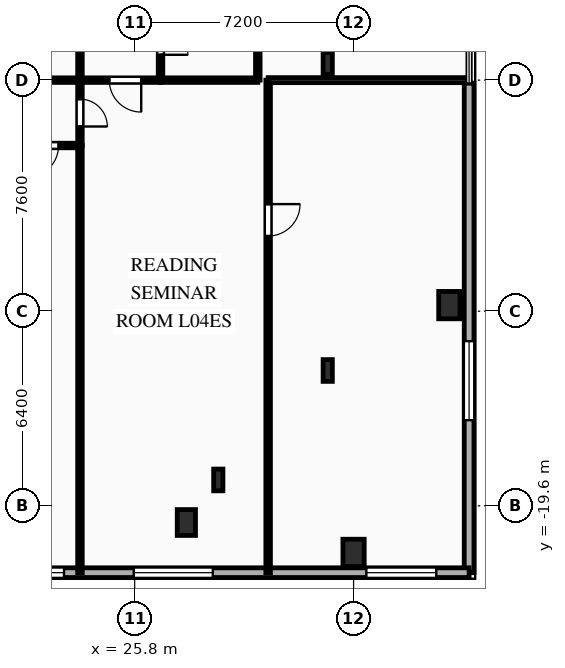
"""IFC4 building model, lengths in metres.
Left out: names, types, materials, properties, quantities, classifications, styles, units other than length and angle.
Written with IfcOpenShell. Run it as: python <this file> out.ifc"""

import sys

from ifc_helpers import new_model, si_unit, direction, frame, frame_2d, origin, origin_2d, place, context, subcontext, project, spatial, rectangle, i_section, extrude, element, fill, save


model = new_model("IFC4")
c1 = context("Model", 3, precision=1e-05, world=origin(), true_north=direction((0.0, 1.0)))
c2 = subcontext(c1, "Body", "Model", "MODEL_VIEW")
j1 = project(units=[si_unit("LENGTHUNIT", "METRE"), si_unit("PLANEANGLEUNIT", "RADIAN")], contexts=[c1])
p1 = place(None, origin())
s1 = spatial("IfcSite", under=j1, at=p1, CompositionType="ELEMENT")
p2 = place(p1, origin())
s2 = spatial("IfcBuilding", under=s1, at=p2, CompositionType="ELEMENT")
p3 = place(p2, frame((0.0, 0.0, 18.0)))
s3 = spatial("IfcBuildingStorey", under=s2, at=p3, CompositionType="ELEMENT", Elevation=18.0)
for number, where, z_axis, x_axis in (
    (1, (33.0, -21.15, 0.0), (0.0, 0.0, 1.0), (1.0, 0.0, 0.0)),
    (2, (36.15, -13.0, 0.0), (0.0, 0.0, 1.0), (1.0, 0.0, 0.0)),
):
    element("IfcColumn", number, at=place(p3, frame(where, z_axis=z_axis, x_axis=x_axis)), inside=s3, PredefinedType="COLUMN", context=c2, shape_type="SweptSolid", body=[
        extrude(rectangle(XDim=0.7, YDim=0.9, at=origin_2d()), origin(), (0.0, 0.0, 1.0), 4.5),
    ])
p4 = place(p3, frame((27.5, -20.15, 0.0), z_axis=(0.0, 0.0, 1.0), x_axis=(1.0, 0.0, 0.0)))
e3 = element("IfcColumn", 3, at=p4, inside=s3, PredefinedType="PILASTER", context=c2, shape_type="SweptSolid", body=[
    extrude(rectangle(XDim=0.6, YDim=0.85, at=origin_2d()), origin(), (0.0, 0.0, 1.0), 4.5),
])
for number, where, z_axis, x_axis in (
    (4, (28.55, -18.75, 0.0), (0.0, 0.0, 1.0), (1.0, 0.0, 0.0)),
    (5, (32.15, -15.15, 0.0), (0.0, 0.0, 1.0), (1.0, 0.0, 0.0)),
    (6, (32.15, -5.05, 0.0), (0.0, 0.0, 1.0), (1.0, 0.0, 0.0)),
):
    element("IfcColumn", number, at=place(p3, frame(where, z_axis=z_axis, x_axis=x_axis)), inside=s3, PredefinedType="COLUMN", context=c2, shape_type="SweptSolid", body=[
        extrude(i_section(OverallWidth=0.304, OverallDepth=0.716, WebThickness=0.021, FlangeThickness=0.04, FilletRadius=0.027, at=origin_2d()), origin(), (0.0, 0.0, 1.0), 4.5),
    ])
p5 = place(p3, frame((36.8, -5.7, 0.0), z_axis=(0.0, 0.0, 1.0), x_axis=(0.0, -1.0, 0.0)))
e7 = element("IfcWall", 7, at=p5, inside=s3, PredefinedType="SOLIDWALL", context=c2, shape_type="SweptSolid", body=[
    extrude(rectangle(XDim=16.1, YDim=0.32, at=frame_2d((8.05, 0.0))), origin(), (0.0, 0.0, 1.0), 4.17),
])
p6 = place(p5, frame((8.485, 0.0, 0.85)))
e8 = element("IfcOpeningElement", 8, at=p6, cuts=e7, PredefinedType="OPENING", context=c2, shape_type="SweptSolid", body=[
    extrude(rectangle(XDim=2.6, YDim=2.4, at=frame_2d((1.3, 1.2))), frame((0.0, 0.17, 0.0), z_axis=(0.0, -1.0, 0.0), x_axis=(1.0, 0.0, 0.0)), (0.0, 0.0, 1.0), 0.34),
])
p7 = place(p3, frame((36.8, -21.8, 0.0), z_axis=(0.0, 0.0, 1.0), x_axis=(-1.0, 0.0, 0.0)))
e9 = element("IfcWall", 9, at=p7, inside=s3, PredefinedType="SOLIDWALL", context=c2, shape_type="SweptSolid", body=[
    extrude(rectangle(XDim=73.6, YDim=0.32, at=frame_2d((36.8, 0.0))), origin(), (0.0, 0.0, 1.0), 4.17),
])
p8 = place(p7, frame((1.079, 0.0, 0.85)))
e10 = element("IfcOpeningElement", 10, at=p8, cuts=e9, PredefinedType="OPENING", context=c2, shape_type="SweptSolid", body=[
    extrude(rectangle(XDim=2.3, YDim=2.4, at=frame_2d((1.15, 1.2))), frame((0.0, 0.17, 0.0), z_axis=(0.0, -1.0, 0.0), x_axis=(1.0, 0.0, 0.0)), (0.0, 0.0, 1.0), 0.34),
])
p9 = place(p7, frame((8.431, 0.0, 0.85)))
e11 = element("IfcOpeningElement", 11, at=p9, cuts=e9, PredefinedType="OPENING", context=c2, shape_type="SweptSolid", body=[
    extrude(rectangle(XDim=2.6, YDim=2.4, at=frame_2d((1.3, 1.2))), frame((0.0, 0.17, 0.0), z_axis=(0.0, -1.0, 0.0), x_axis=(1.0, 0.0, 0.0)), (0.0, 0.0, 1.0), 0.34),
])
p10 = place(p7, frame((13.324, 0.0, 0.85)))
e12 = element("IfcOpeningElement", 12, at=p10, cuts=e9, PredefinedType="OPENING", context=c2, shape_type="SweptSolid", body=[
    extrude(rectangle(XDim=1.1, YDim=1.85, at=frame_2d((0.55, 0.925))), frame((0.0, 0.17, 0.0), z_axis=(0.0, -1.0, 0.0), x_axis=(1.0, 0.0, 0.0)), (0.0, 0.0, 1.0), 0.34),
])
p11 = place(p7, frame((16.619, 0.0, 0.85)))
e13 = element("IfcOpeningElement", 13, at=p11, cuts=e9, PredefinedType="OPENING", context=c2, shape_type="SweptSolid", body=[
    extrude(rectangle(XDim=2.0, YDim=2.4, at=frame_2d((1.0, 1.2))), frame((0.0, 0.17, 0.0), z_axis=(0.0, -1.0, 0.0), x_axis=(1.0, 0.0, 0.0)), (0.0, 0.0, 1.0), 0.34),
])
p12 = place(p7, frame((21.125, 0.0, 0.85)))
e14 = element("IfcOpeningElement", 14, at=p12, cuts=e9, PredefinedType="OPENING", context=c2, shape_type="SweptSolid", body=[
    extrude(rectangle(XDim=2.6, YDim=2.4, at=frame_2d((1.3, 1.2))), frame((0.0, 0.17, 0.0), z_axis=(0.0, -1.0, 0.0), x_axis=(1.0, 0.0, 0.0)), (0.0, 0.0, 1.0), 0.34),
])
p13 = place(p7, frame((27.531, 0.0, 0.85)))
e15 = element("IfcOpeningElement", 15, at=p13, cuts=e9, PredefinedType="OPENING", context=c2, shape_type="SweptSolid", body=[
    extrude(rectangle(XDim=2.6, YDim=2.4, at=frame_2d((1.3, 1.2))), frame((0.0, 0.17, 0.0), z_axis=(0.0, -1.0, 0.0), x_axis=(1.0, 0.0, 0.0)), (0.0, 0.0, 1.0), 0.34),
])
p14 = place(p7, frame((33.474, 0.0, 0.85)))
e16 = element("IfcOpeningElement", 16, at=p14, cuts=e9, PredefinedType="OPENING", context=c2, shape_type="SweptSolid", body=[
    extrude(rectangle(XDim=2.6, YDim=2.4, at=frame_2d((1.3, 1.2))), frame((0.0, 0.17, 0.0), z_axis=(0.0, -1.0, 0.0), x_axis=(1.0, 0.0, 0.0)), (0.0, 0.0, 1.0), 0.34),
])
p15 = place(p7, frame((41.427, 0.0, 0.85)))
e17 = element("IfcOpeningElement", 17, at=p15, cuts=e9, PredefinedType="OPENING", context=c2, shape_type="SweptSolid", body=[
    extrude(rectangle(XDim=2.6, YDim=2.4, at=frame_2d((1.3, 1.2))), frame((0.0, 0.17, 0.0), z_axis=(0.0, -1.0, 0.0), x_axis=(1.0, 0.0, 0.0)), (0.0, 0.0, 1.0), 0.34),
])
p16 = place(p7, frame((48.177, 0.0, 0.85)))
e18 = element("IfcOpeningElement", 18, at=p16, cuts=e9, PredefinedType="OPENING", context=c2, shape_type="SweptSolid", body=[
    extrude(rectangle(XDim=2.0, YDim=2.4, at=frame_2d((1.0, 1.2))), frame((0.0, 0.17, 0.0), z_axis=(0.0, -1.0, 0.0), x_axis=(1.0, 0.0, 0.0)), (0.0, 0.0, 1.0), 0.34),
])
p17 = place(p7, frame((51.798, 0.0, 0.85)))
e19 = element("IfcOpeningElement", 19, at=p17, cuts=e9, PredefinedType="OPENING", context=c2, shape_type="SweptSolid", body=[
    extrude(rectangle(XDim=2.6, YDim=2.4, at=frame_2d((1.3, 1.2))), frame((0.0, 0.17, 0.0), z_axis=(0.0, -1.0, 0.0), x_axis=(1.0, 0.0, 0.0)), (0.0, 0.0, 1.0), 0.34),
])
p18 = place(p7, frame((56.111, 0.0, 0.85)))
e20 = element("IfcOpeningElement", 20, at=p18, cuts=e9, PredefinedType="OPENING", context=c2, shape_type="SweptSolid", body=[
    extrude(rectangle(XDim=2.3, YDim=2.4, at=frame_2d((1.15, 1.2))), frame((0.0, 0.17, 0.0), z_axis=(0.0, -1.0, 0.0), x_axis=(1.0, 0.0, 0.0)), (0.0, 0.0, 1.0), 0.34),
])
p19 = place(p7, frame((62.649, 0.0, 0.85)))
e21 = element("IfcOpeningElement", 21, at=p19, cuts=e9, PredefinedType="OPENING", context=c2, shape_type="SweptSolid", body=[
    extrude(rectangle(XDim=2.6, YDim=2.4, at=frame_2d((1.3, 1.2))), frame((0.0, 0.17, 0.0), z_axis=(0.0, -1.0, 0.0), x_axis=(1.0, 0.0, 0.0)), (0.0, 0.0, 1.0), 0.34),
])
p20 = place(p7, frame((70.301, 0.0, 0.85)))
e22 = element("IfcOpeningElement", 22, at=p20, cuts=e9, PredefinedType="OPENING", context=c2, shape_type="SweptSolid", body=[
    extrude(rectangle(XDim=2.3, YDim=2.4, at=frame_2d((1.15, 1.2))), frame((0.0, 0.17, 0.0), z_axis=(0.0, -1.0, 0.0), x_axis=(1.0, 0.0, 0.0)), (0.0, 0.0, 1.0), 0.34),
])
p21 = place(p3, frame((24.0, -5.6, 0.0), z_axis=(0.0, 0.0, 1.0), x_axis=(0.0, -1.0, 0.0)))
e23 = element("IfcWall", 23, at=p21, inside=s3, PredefinedType="PARTITIONING", context=c2, shape_type="SweptSolid", body=[
    extrude(rectangle(XDim=2.15, YDim=0.15, at=frame_2d((1.075, 0.0))), origin(), (0.0, 0.0, 1.0), 4.17),
])
p22 = place(p21, frame((0.625, 0.0, 0.0)))
e24 = element("IfcOpeningElement", 24, at=p22, cuts=e23, PredefinedType="OPENING", context=c2, shape_type="SweptSolid", body=[
    extrude(rectangle(XDim=0.9, YDim=2.1, at=frame_2d((0.45, 1.05))), frame((0.0, 0.085, 0.0), z_axis=(0.0, -1.0, 0.0), x_axis=(1.0, 0.0, 0.0)), (0.0, 0.0, 1.0), 0.17),
])
p23 = place(p3, frame((18.8, -5.6, 0.0), z_axis=(0.0, 0.0, 1.0), x_axis=(1.0, 0.0, 0.0)))
e25 = element("IfcWall", 25, at=p23, inside=s3, PredefinedType="PARTITIONING", context=c2, shape_type="SweptSolid", body=[
    extrude(rectangle(XDim=5.2, YDim=0.15, at=frame_2d((2.6, 0.0))), origin(), (0.0, 0.0, 1.0), 4.17),
])
p24 = place(p3, frame((24.0, -7.75, 0.0), z_axis=(0.0, 0.0, 1.0), x_axis=(-1.0, 0.0, 0.0)))
e26 = element("IfcWall", 26, at=p24, inside=s3, PredefinedType="PARTITIONING", context=c2, shape_type="SweptSolid", body=[
    extrude(rectangle(XDim=3.194, YDim=0.15, at=frame_2d((1.597, 0.0))), origin(), (0.0, 0.0, 1.0), 4.17),
])
p25 = place(p24, frame((0.703, 0.0, 0.0)))
e27 = element("IfcOpeningElement", 27, at=p25, cuts=e26, PredefinedType="OPENING", context=c2, shape_type="SweptSolid", body=[
    extrude(rectangle(XDim=1.05, YDim=2.15, at=frame_2d((0.525, 1.075))), frame((0.0, 0.085, 0.0), z_axis=(0.0, -1.0, 0.0), x_axis=(1.0, 0.0, 0.0)), (0.0, 0.0, 1.0), 0.17),
])
p26 = place(p3, frame((26.65, -5.6, 0.0), z_axis=(0.0, 0.0, 1.0), x_axis=(-1.0, 0.0, 0.0)))
e28 = element("IfcWall", 28, at=p26, inside=s3, PredefinedType="PARTITIONING", context=c2, shape_type="SweptSolid", body=[
    extrude(rectangle(XDim=2.65, YDim=0.15, at=frame_2d((1.325, 0.0))), origin(), (0.0, 0.0, 1.0), 4.17),
])
p27 = place(p26, frame((0.635, 0.0, 0.0)))
e29 = element("IfcOpeningElement", 29, at=p27, cuts=e28, PredefinedType="OPENING", context=c2, shape_type="SweptSolid", body=[
    extrude(rectangle(XDim=1.05, YDim=2.15, at=frame_2d((0.525, 1.075))), frame((0.0, 0.085, 0.0), z_axis=(0.0, -1.0, 0.0), x_axis=(1.0, 0.0, 0.0)), (0.0, 0.0, 1.0), 0.17),
])
p28 = place(p3, frame((26.65, -3.25, 0.0), z_axis=(0.0, 0.0, 1.0), x_axis=(0.0, -1.0, 0.0)))
e30 = element("IfcWall", 30, at=p28, inside=s3, PredefinedType="PLUMBINGWALL", context=c2, shape_type="SweptSolid", body=[
    extrude(rectangle(XDim=2.35, YDim=0.15, at=frame_2d((1.175, 0.0))), origin(), (0.0, 0.0, 1.0), 4.17),
])
p29 = place(p28, frame((0.616, 0.0, 0.0)))
e31 = element("IfcOpeningElement", 31, at=p29, cuts=e30, PredefinedType="OPENING", context=c2, shape_type="SweptSolid", body=[
    extrude(rectangle(XDim=0.9, YDim=2.1, at=frame_2d((0.45, 1.05))), frame((0.0, 0.085, 0.0), z_axis=(0.0, -1.0, 0.0), x_axis=(1.0, 0.0, 0.0)), (0.0, 0.0, 1.0), 0.17),
])
p30 = place(p3, frame((24.0, -5.6, 0.0), z_axis=(0.0, 0.0, 1.0), x_axis=(0.0, 1.0, 0.0)))
e32 = element("IfcWall", 32, at=p30, inside=s3, PredefinedType="PARTITIONING", context=c2, shape_type="SweptSolid", body=[
    extrude(rectangle(XDim=14.1, YDim=0.15, at=frame_2d((7.05, 0.0))), origin(), (0.0, 0.0, 1.0), 4.17),
])
p31 = place(p3, frame((30.19, -5.6, 0.0), z_axis=(0.0, 0.0, 1.0), x_axis=(0.0, -1.0, 0.0)))
e33 = element("IfcWall", 33, at=p31, inside=s3, PredefinedType="PARTITIONING", context=c2, shape_type="SweptSolid", body=[
    extrude(rectangle(XDim=16.2, YDim=0.15, at=frame_2d((8.1, 0.0))), origin(), (0.0, 0.0, 1.0), 4.17),
])
p32 = place(p31, frame((4.077, 0.0, 0.0)))
e34 = element("IfcOpeningElement", 34, at=p32, cuts=e33, PredefinedType="OPENING", context=c2, shape_type="SweptSolid", body=[
    extrude(rectangle(XDim=1.05, YDim=2.15, at=frame_2d((0.525, 1.075))), frame((0.0, 0.085, 0.0), z_axis=(0.0, -1.0, 0.0), x_axis=(1.0, 0.0, 0.0)), (0.0, 0.0, 1.0), 0.17),
])
p33 = place(p3, frame((26.65, -5.6, 0.0), z_axis=(0.0, 0.0, 1.0), x_axis=(1.0, 0.0, 0.0)))
e35 = element("IfcWall", 35, at=p33, inside=s3, PredefinedType="PLUMBINGWALL", context=c2, shape_type="SweptSolid", body=[
    extrude(rectangle(XDim=3.2, YDim=0.15, at=frame_2d((1.6, 0.0))), origin(), (0.0, 0.0, 1.0), 4.17),
])
p34 = place(p3, frame((24.0, -21.8, 0.0), z_axis=(0.0, 0.0, 1.0), x_axis=(0.0, 1.0, 0.0)))
e36 = element("IfcWall", 36, at=p34, inside=s3, PredefinedType="PARTITIONING", context=c2, shape_type="SweptSolid", body=[
    extrude(rectangle(XDim=14.05, YDim=0.15, at=frame_2d((7.025, 0.0))), origin(), (0.0, 0.0, 1.0), 4.17),
])
p35 = place(p3, frame((30.19, -5.6, 0.0), z_axis=(0.0, 0.0, 1.0), x_axis=(1.0, 0.0, 0.0)))
e37 = element("IfcWall", 37, at=p35, inside=s3, PredefinedType="PARTITIONING", context=c2, shape_type="SweptSolid", body=[
    extrude(rectangle(XDim=6.61, YDim=0.165, at=frame_2d((3.305, 0.0))), origin(), (0.0, 0.0, 1.0), 4.17),
])
p36 = place(p3, frame((29.85, -3.25, 0.0), z_axis=(0.0, 0.0, 1.0), x_axis=(0.0, -1.0, 0.0)))
e38 = element("IfcWall", 38, at=p36, inside=s3, PredefinedType="PLUMBINGWALL", context=c2, shape_type="SweptSolid", body=[
    extrude(rectangle(XDim=2.35, YDim=0.15, at=frame_2d((1.175, 0.0))), origin(), (0.0, 0.0, 1.0), 4.17),
])
p37 = place(p6, origin())
e39 = element("IfcWindow", 39, at=p37, inside=s3, PartitioningType="SINGLE_PANEL", PredefinedType="WINDOW", context=c2, shape_type="SweptSolid", body=[
    extrude(rectangle(XDim=2.6, YDim=2.4, at=frame_2d((1.3, 1.2))), frame((0.0, 0.03, 0.0), z_axis=(0.0, -1.0, 0.0), x_axis=(1.0, 0.0, 0.0)), (0.0, 0.0, 1.0), 0.06),
])
fill(e8, e39)
p38 = place(p8, origin())
e40 = element("IfcWindow", 40, at=p38, inside=s3, PartitioningType="SINGLE_PANEL", PredefinedType="WINDOW", context=c2, shape_type="SweptSolid", body=[
    extrude(rectangle(XDim=2.3, YDim=2.4, at=frame_2d((1.15, 1.2))), frame((0.0, 0.03, 0.0), z_axis=(0.0, -1.0, 0.0), x_axis=(1.0, 0.0, 0.0)), (0.0, 0.0, 1.0), 0.06),
])
fill(e10, e40)
p39 = place(p9, origin())
e41 = element("IfcWindow", 41, at=p39, inside=s3, PartitioningType="SINGLE_PANEL", PredefinedType="WINDOW", context=c2, shape_type="SweptSolid", body=[
    extrude(rectangle(XDim=2.6, YDim=2.4, at=frame_2d((1.3, 1.2))), frame((0.0, 0.03, 0.0), z_axis=(0.0, -1.0, 0.0), x_axis=(1.0, 0.0, 0.0)), (0.0, 0.0, 1.0), 0.06),
])
fill(e11, e41)
p40 = place(p10, origin())
e42 = element("IfcWindow", 42, at=p40, inside=s3, PartitioningType="SINGLE_PANEL", PredefinedType="WINDOW", context=c2, shape_type="SweptSolid", body=[
    extrude(rectangle(XDim=1.1, YDim=1.85, at=frame_2d((0.55, 0.925))), frame((0.0, 0.03, 0.0), z_axis=(0.0, -1.0, 0.0), x_axis=(1.0, 0.0, 0.0)), (0.0, 0.0, 1.0), 0.06),
])
fill(e12, e42)
p41 = place(p22, origin())
e43 = element("IfcDoor", 43, at=p41, inside=s3, OperationType="SINGLE_SWING_RIGHT", PredefinedType="DOOR", context=c2, shape_type="SweptSolid", body=[
    extrude(rectangle(XDim=0.9, YDim=2.1, at=frame_2d((0.45, 1.05))), frame((0.0, 0.025, 0.0), z_axis=(0.0, -1.0, 0.0), x_axis=(1.0, 0.0, 0.0)), (0.0, 0.0, 1.0), 0.05),
])
fill(e24, e43)
p42 = place(p25, origin())
e44 = element("IfcDoor", 44, at=p42, inside=s3, OperationType="SINGLE_SWING_RIGHT", PredefinedType="DOOR", context=c2, shape_type="SweptSolid", body=[
    extrude(rectangle(XDim=1.05, YDim=2.15, at=frame_2d((0.525, 1.075))), frame((0.0, 0.025, 0.0), z_axis=(0.0, -1.0, 0.0), x_axis=(1.0, 0.0, 0.0)), (0.0, 0.0, 1.0), 0.05),
])
fill(e27, e44)
p43 = place(p27, origin())
e45 = element("IfcDoor", 45, at=p43, inside=s3, OperationType="SINGLE_SWING_LEFT", PredefinedType="DOOR", context=c2, shape_type="SweptSolid", body=[
    extrude(rectangle(XDim=1.05, YDim=2.15, at=frame_2d((0.525, 1.075))), frame((0.0, 0.025, 0.0), z_axis=(0.0, -1.0, 0.0), x_axis=(1.0, 0.0, 0.0)), (0.0, 0.0, 1.0), 0.05),
])
fill(e29, e45)
p44 = place(p29, origin())
e46 = element("IfcDoor", 46, at=p44, inside=s3, OperationType="SINGLE_SWING_RIGHT", PredefinedType="DOOR", context=c2, shape_type="SweptSolid", body=[
    extrude(rectangle(XDim=0.9, YDim=2.1, at=frame_2d((0.45, 1.05))), frame((0.0, 0.025, 0.0), z_axis=(0.0, -1.0, 0.0), x_axis=(1.0, 0.0, 0.0)), (0.0, 0.0, 1.0), 0.05),
])
fill(e31, e46)
p45 = place(p32, origin())
e47 = element("IfcDoor", 47, at=p45, inside=s3, OperationType="SINGLE_SWING_LEFT", PredefinedType="DOOR", context=c2, shape_type="SweptSolid", body=[
    extrude(rectangle(XDim=1.05, YDim=2.15, at=frame_2d((0.525, 1.075))), frame((0.0, 0.025, 0.0), z_axis=(0.0, -1.0, 0.0), x_axis=(1.0, 0.0, 0.0)), (0.0, 0.0, 1.0), 0.05),
])
fill(e34, e47)
save(model, sys.argv[1])
